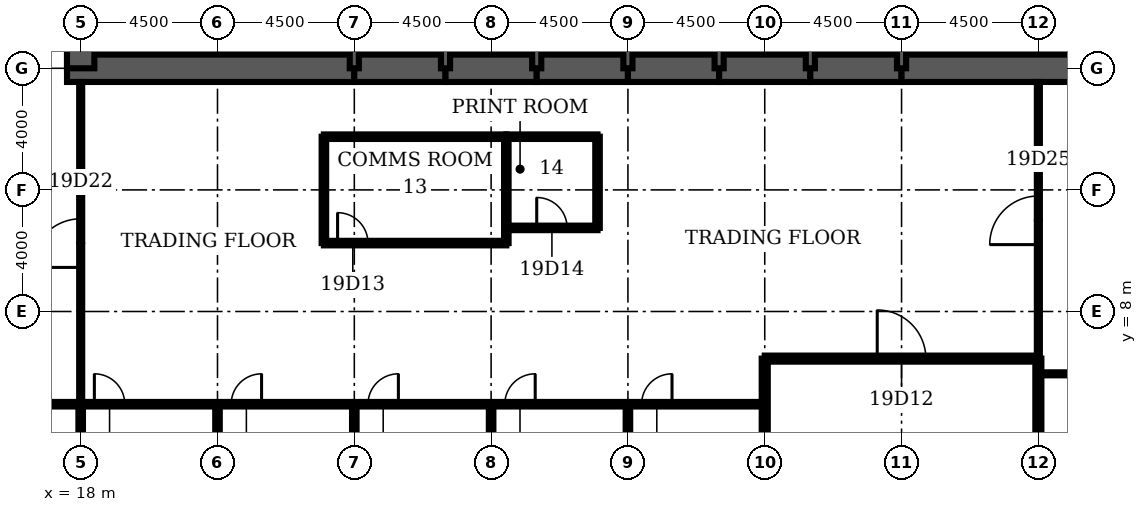
"""IFC4 building model, lengths in metres.
Left out: names, types, materials, properties, quantities, classifications, styles, units other than length and angle.
Written with IfcOpenShell. Run it as: python <this file> out.ifc"""

import sys

from ifc_helpers import new_model, si_unit, direction, frame, frame_2d, origin, place, context, subcontext, project, spatial, rectangle, extrude, element, fill, save


model = new_model("IFC4")
c1 = context("Model", 3, precision=1e-05, world=origin(), true_north=direction((0.0, 1.0)))
c2 = subcontext(c1, "Body", "Model", "MODEL_VIEW")
j1 = project(units=[si_unit("LENGTHUNIT", "METRE"), si_unit("PLANEANGLEUNIT", "RADIAN")], contexts=[c1])
p1 = place(None, origin())
s1 = spatial("IfcSite", under=j1, at=p1, CompositionType="ELEMENT")
p2 = place(p1, origin())
s2 = spatial("IfcBuilding", under=s1, at=p2, CompositionType="ELEMENT")
p3 = place(p2, frame((0.0, 0.0, 90.5)))
s3 = spatial("IfcBuildingStorey", under=s2, at=p3, CompositionType="ELEMENT", Elevation=90.5)
p4 = place(p3, frame((17.55, 16.0, 0.0), z_axis=(0.0, 0.0, 1.0), x_axis=(1.0, 0.0, 0.0)))
e1 = element("IfcWall", 1, at=p4, inside=s3, PredefinedType="SHEAR", context=c2, shape_type="SweptSolid", body=[
    extrude(rectangle(XDim=9.45, YDim=0.9, at=frame_2d((4.725, 0.0))), origin(), (0.0, 0.0, 1.0), 4.5),
])
for number, where, z_axis, x_axis in (
    (2, (27.0, 16.0, 0.0), (0.0, 0.0, 1.0), (1.0, 0.0, 0.0)),
    (3, (30.0, 16.0, 0.0), (0.0, 0.0, 1.0), (1.0, 0.0, 0.0)),
    (4, (33.0, 16.0, 0.0), (0.0, 0.0, 1.0), (1.0, 0.0, 0.0)),
    (5, (36.0, 16.0, 0.0), (0.0, 0.0, 1.0), (1.0, 0.0, 0.0)),
    (6, (39.0, 16.0, 0.0), (0.0, 0.0, 1.0), (1.0, 0.0, 0.0)),
    (7, (42.0, 16.0, 0.0), (0.0, 0.0, 1.0), (1.0, 0.0, 0.0)),
):
    element("IfcWall", number, at=place(p3, frame(where, z_axis=z_axis, x_axis=x_axis)), inside=s3, PredefinedType="SHEAR", context=c2, shape_type="SweptSolid", body=[
        extrude(rectangle(XDim=3.0, YDim=0.9, at=frame_2d((1.5, 0.0))), origin(), (0.0, 0.0, 1.0), 4.5),
    ])
p5 = place(p3, frame((45.0, 16.0, 0.0), z_axis=(0.0, 0.0, 1.0), x_axis=(1.0, 0.0, 0.0)))
e8 = element("IfcWall", 8, at=p5, inside=s3, PredefinedType="SHEAR", context=c2, shape_type="SweptSolid", body=[
    extrude(rectangle(XDim=9.45, YDim=0.9, at=frame_2d((4.725, 0.0))), origin(), (0.0, 0.0, 1.0), 4.5),
])
p6 = place(p3, frame((18.0, 19.2, 0.0), z_axis=(0.0, 0.0, 1.0), x_axis=(0.0, -1.0, 0.0)))
e9 = element("IfcWall", 9, at=p6, inside=s3, PredefinedType="SHEAR", context=c2, shape_type="SweptSolid", body=[
    extrude(rectangle(XDim=3.2, YDim=0.9, at=frame_2d((1.6, 0.0))), origin(), (0.0, 0.0, 1.0), 4.5),
])
for number, where, z_axis, x_axis in (
    (10, (27.0, 16.0, 0.0), (0.0, 0.0, 1.0), (0.0, 1.0, 0.0)),
    (11, (30.0, 16.0, 0.0), (0.0, 0.0, 1.0), (0.0, 1.0, 0.0)),
    (12, (33.0, 16.0, 0.0), (0.0, 0.0, 1.0), (0.0, 1.0, 0.0)),
    (13, (36.0, 16.0, 0.0), (0.0, 0.0, 1.0), (0.0, 1.0, 0.0)),
    (14, (39.0, 16.0, 0.0), (0.0, 0.0, 1.0), (0.0, 1.0, 0.0)),
    (15, (42.0, 16.0, 0.0), (0.0, 0.0, 1.0), (0.0, 1.0, 0.0)),
    (16, (45.0, 16.0, 0.0), (0.0, 0.0, 1.0), (0.0, 1.0, 0.0)),
):
    element("IfcWall", number, at=place(p3, frame(where, z_axis=z_axis, x_axis=x_axis)), inside=s3, PredefinedType="SOLIDWALL", context=c2, shape_type="SweptSolid", body=[
        extrude(rectangle(XDim=3.2, YDim=0.3, at=frame_2d((1.6, 0.0))), origin(), (0.0, 0.0, 1.0), 4.5),
    ])
p7 = place(p3, frame((4.5, 4.95, 0.0), z_axis=(0.0, 0.0, 1.0), x_axis=(1.0, 0.0, 0.0)))
e17 = element("IfcWall", 17, at=p7, inside=s3, PredefinedType="PARTITIONING", context=c2, shape_type="SweptSolid", body=[
    extrude(rectangle(XDim=36.0, YDim=0.15, at=frame_2d((18.0, 0.0))), origin(), (0.0, 0.0, 1.0), 3.0),
])
p8 = place(p7, frame((0.45, 0.0, 0.0)))
e18 = element("IfcOpeningElement", 18, at=p8, cuts=e17, PredefinedType="OPENING", context=c2, shape_type="SweptSolid", body=[
    extrude(rectangle(XDim=1.0, YDim=2.1, at=frame_2d((0.5, 1.05))), frame((0.0, 0.085, 0.0), z_axis=(0.0, -1.0, 0.0), x_axis=(1.0, 0.0, 0.0)), (0.0, 0.0, 1.0), 0.17),
])
p9 = place(p7, frame((4.95, 0.0, 0.0)))
e19 = element("IfcOpeningElement", 19, at=p9, cuts=e17, PredefinedType="OPENING", context=c2, shape_type="SweptSolid", body=[
    extrude(rectangle(XDim=1.0, YDim=2.1, at=frame_2d((0.5, 1.05))), frame((0.0, 0.085, 0.0), z_axis=(0.0, -1.0, 0.0), x_axis=(1.0, 0.0, 0.0)), (0.0, 0.0, 1.0), 0.17),
])
p10 = place(p7, frame((9.45, 0.0, 0.0)))
e20 = element("IfcOpeningElement", 20, at=p10, cuts=e17, PredefinedType="OPENING", context=c2, shape_type="SweptSolid", body=[
    extrude(rectangle(XDim=1.0, YDim=2.1, at=frame_2d((0.5, 1.05))), frame((0.0, 0.085, 0.0), z_axis=(0.0, -1.0, 0.0), x_axis=(1.0, 0.0, 0.0)), (0.0, 0.0, 1.0), 0.17),
])
p11 = place(p7, frame((13.95, 0.0, 0.0)))
e21 = element("IfcOpeningElement", 21, at=p11, cuts=e17, PredefinedType="OPENING", context=c2, shape_type="SweptSolid", body=[
    extrude(rectangle(XDim=1.0, YDim=2.1, at=frame_2d((0.5, 1.05))), frame((0.0, 0.085, 0.0), z_axis=(0.0, -1.0, 0.0), x_axis=(1.0, 0.0, 0.0)), (0.0, 0.0, 1.0), 0.17),
])
p12 = place(p7, frame((18.45, 0.0, 0.0)))
e22 = element("IfcOpeningElement", 22, at=p12, cuts=e17, PredefinedType="OPENING", context=c2, shape_type="SweptSolid", body=[
    extrude(rectangle(XDim=1.0, YDim=2.1, at=frame_2d((0.5, 1.05))), frame((0.0, 0.085, 0.0), z_axis=(0.0, -1.0, 0.0), x_axis=(1.0, 0.0, 0.0)), (0.0, 0.0, 1.0), 0.17),
])
p13 = place(p7, frame((22.95, 0.0, 0.0)))
e23 = element("IfcOpeningElement", 23, at=p13, cuts=e17, PredefinedType="OPENING", context=c2, shape_type="SweptSolid", body=[
    extrude(rectangle(XDim=1.0, YDim=2.1, at=frame_2d((0.5, 1.05))), frame((0.0, 0.085, 0.0), z_axis=(0.0, -1.0, 0.0), x_axis=(1.0, 0.0, 0.0)), (0.0, 0.0, 1.0), 0.17),
])
p14 = place(p7, frame((27.45, 0.0, 0.0)))
e24 = element("IfcOpeningElement", 24, at=p14, cuts=e17, PredefinedType="OPENING", context=c2, shape_type="SweptSolid", body=[
    extrude(rectangle(XDim=1.0, YDim=2.1, at=frame_2d((0.5, 1.05))), frame((0.0, 0.085, 0.0), z_axis=(0.0, -1.0, 0.0), x_axis=(1.0, 0.0, 0.0)), (0.0, 0.0, 1.0), 0.17),
])
p15 = place(p7, frame((31.95, 0.0, 0.0)))
e25 = element("IfcOpeningElement", 25, at=p15, cuts=e17, PredefinedType="OPENING", context=c2, shape_type="SweptSolid", body=[
    extrude(rectangle(XDim=1.0, YDim=2.1, at=frame_2d((0.5, 1.05))), frame((0.0, 0.085, 0.0), z_axis=(0.0, -1.0, 0.0), x_axis=(1.0, 0.0, 0.0)), (0.0, 0.0, 1.0), 0.17),
])
p16 = place(p3, frame((49.5, 5.95, 0.0), z_axis=(0.0, 0.0, 1.0), x_axis=(1.0, 0.0, 0.0)))
e26 = element("IfcWall", 26, at=p16, inside=s3, PredefinedType="PARTITIONING", context=c2, shape_type="SweptSolid", body=[
    extrude(rectangle(XDim=9.0, YDim=0.1, at=frame_2d((4.5, 0.0))), origin(), (0.0, 0.0, 1.0), 3.0),
])
p17 = place(p16, frame((4.0, 0.0, 0.0)))
e27 = element("IfcOpeningElement", 27, at=p17, cuts=e26, PredefinedType="OPENING", context=c2, shape_type="SweptSolid", body=[
    extrude(rectangle(XDim=1.0, YDim=2.1, at=frame_2d((0.5, 1.05))), frame((0.0, 0.06, 0.0), z_axis=(0.0, -1.0, 0.0), x_axis=(1.0, 0.0, 0.0)), (0.0, 0.0, 1.0), 0.12),
])
p18 = place(p3, frame((40.5, 6.45, 0.0), z_axis=(0.0, 0.0, 1.0), x_axis=(1.0, 0.0, 0.0)))
e28 = element("IfcWall", 28, at=p18, inside=s3, PredefinedType="PARTITIONING", context=c2, shape_type="SweptSolid", body=[
    extrude(rectangle(XDim=9.0, YDim=0.2, at=frame_2d((4.5, 0.0))), origin(), (0.0, 0.0, 1.0), 3.0),
])
p19 = place(p18, frame((3.7, 0.0, 0.0)))
e29 = element("IfcOpeningElement", 29, at=p19, cuts=e28, PredefinedType="OPENING", context=c2, shape_type="SweptSolid", body=[
    extrude(rectangle(XDim=1.6, YDim=2.1, at=frame_2d((0.8, 1.05))), frame((0.0, 0.11, 0.0), z_axis=(0.0, -1.0, 0.0), x_axis=(1.0, 0.0, 0.0)), (0.0, 0.0, 1.0), 0.22),
])
p20 = place(p3, frame((26.0, 10.25, 0.0), z_axis=(0.0, 0.0, 1.0), x_axis=(1.0, 0.0, 0.0)))
e30 = element("IfcWall", 30, at=p20, inside=s3, PredefinedType="PARTITIONING", context=c2, shape_type="SweptSolid", body=[
    extrude(rectangle(XDim=6.0, YDim=0.15, at=frame_2d((3.0, 0.0))), origin(), (0.0, 0.0, 1.0), 3.0),
])
p21 = place(p20, frame((0.45, 0.0, 0.0)))
e31 = element("IfcOpeningElement", 31, at=p21, cuts=e30, PredefinedType="OPENING", context=c2, shape_type="SweptSolid", body=[
    extrude(rectangle(XDim=1.0, YDim=2.1, at=frame_2d((0.5, 1.05))), frame((0.0, 0.085, 0.0), z_axis=(0.0, -1.0, 0.0), x_axis=(1.0, 0.0, 0.0)), (0.0, 0.0, 1.0), 0.17),
])
p22 = place(p3, frame((32.0, 10.75, 0.0), z_axis=(0.0, 0.0, 1.0), x_axis=(1.0, 0.0, 0.0)))
e32 = element("IfcWall", 32, at=p22, inside=s3, PredefinedType="PARTITIONING", context=c2, shape_type="SweptSolid", body=[
    extrude(rectangle(XDim=3.0, YDim=0.15, at=frame_2d((1.5, 0.0))), origin(), (0.0, 0.0, 1.0), 3.0),
])
p23 = place(p22, frame((1.0, 0.0, 0.0)))
e33 = element("IfcOpeningElement", 33, at=p23, cuts=e32, PredefinedType="OPENING", context=c2, shape_type="SweptSolid", body=[
    extrude(rectangle(XDim=1.0, YDim=2.1, at=frame_2d((0.5, 1.05))), frame((0.0, 0.085, 0.0), z_axis=(0.0, -1.0, 0.0), x_axis=(1.0, 0.0, 0.0)), (0.0, 0.0, 1.0), 0.17),
])
p24 = place(p3, frame((26.0, 13.75, 0.0), z_axis=(0.0, 0.0, 1.0), x_axis=(1.0, 0.0, 0.0)))
e34 = element("IfcWall", 34, at=p24, inside=s3, PredefinedType="PARTITIONING", context=c2, shape_type="SweptSolid", body=[
    extrude(rectangle(XDim=6.0, YDim=0.15, at=frame_2d((3.0, 0.0))), origin(), (0.0, 0.0, 1.0), 3.0),
])
p25 = place(p3, frame((32.0, 13.75, 0.0), z_axis=(0.0, 0.0, 1.0), x_axis=(1.0, 0.0, 0.0)))
e35 = element("IfcWall", 35, at=p25, inside=s3, PredefinedType="PARTITIONING", context=c2, shape_type="SweptSolid", body=[
    extrude(rectangle(XDim=3.0, YDim=0.15, at=frame_2d((1.5, 0.0))), origin(), (0.0, 0.0, 1.0), 3.0),
])
p26 = place(p3, frame((18.0, 0.45, 0.0), z_axis=(0.0, 0.0, 1.0), x_axis=(0.0, 1.0, 0.0)))
e36 = element("IfcWall", 36, at=p26, inside=s3, PredefinedType="PARTITIONING", context=c2, shape_type="SweptSolid", body=[
    extrude(rectangle(XDim=4.5, YDim=0.15, at=frame_2d((2.25, 0.0))), origin(), (0.0, 0.0, 1.0), 3.0),
])
p27 = place(p3, frame((18.0, 4.95, 0.0), z_axis=(0.0, 0.0, 1.0), x_axis=(0.0, 1.0, 0.0)))
e37 = element("IfcWall", 37, at=p27, inside=s3, PredefinedType="PARTITIONING", context=c2, shape_type="SweptSolid", body=[
    extrude(rectangle(XDim=10.6, YDim=0.1, at=frame_2d((5.3, 0.0))), origin(), (0.0, 0.0, 1.0), 3.0),
])
p28 = place(p27, frame((4.5, 0.0, 0.0)))
e38 = element("IfcOpeningElement", 38, at=p28, cuts=e37, PredefinedType="OPENING", context=c2, shape_type="SweptSolid", body=[
    extrude(rectangle(XDim=1.6, YDim=2.1, at=frame_2d((0.8, 1.05))), frame((0.0, 0.06, 0.0), z_axis=(0.0, -1.0, 0.0), x_axis=(1.0, 0.0, 0.0)), (0.0, 0.0, 1.0), 0.12),
])
p29 = place(p3, frame((22.5, 0.45, 0.0), z_axis=(0.0, 0.0, 1.0), x_axis=(0.0, 1.0, 0.0)))
e39 = element("IfcWall", 39, at=p29, inside=s3, PredefinedType="PARTITIONING", context=c2, shape_type="SweptSolid", body=[
    extrude(rectangle(XDim=4.5, YDim=0.15, at=frame_2d((2.25, 0.0))), origin(), (0.0, 0.0, 1.0), 3.0),
])
p30 = place(p3, frame((26.0, 10.25, 0.0), z_axis=(0.0, 0.0, 1.0), x_axis=(0.0, 1.0, 0.0)))
e40 = element("IfcWall", 40, at=p30, inside=s3, PredefinedType="PARTITIONING", context=c2, shape_type="SweptSolid", body=[
    extrude(rectangle(XDim=3.5, YDim=0.15, at=frame_2d((1.75, 0.0))), origin(), (0.0, 0.0, 1.0), 3.0),
])
for number, where, z_axis, x_axis in (
    (41, (27.0, 0.45, 0.0), (0.0, 0.0, 1.0), (0.0, 1.0, 0.0)),
    (42, (31.5, 0.45, 0.0), (0.0, 0.0, 1.0), (0.0, 1.0, 0.0)),
):
    element("IfcWall", number, at=place(p3, frame(where, z_axis=z_axis, x_axis=x_axis)), inside=s3, PredefinedType="PARTITIONING", context=c2, shape_type="SweptSolid", body=[
        extrude(rectangle(XDim=4.5, YDim=0.15, at=frame_2d((2.25, 0.0))), origin(), (0.0, 0.0, 1.0), 3.0),
    ])
p31 = place(p3, frame((32.0, 10.25, 0.0), z_axis=(0.0, 0.0, 1.0), x_axis=(0.0, 1.0, 0.0)))
e43 = element("IfcWall", 43, at=p31, inside=s3, PredefinedType="PARTITIONING", context=c2, shape_type="SweptSolid", body=[
    extrude(rectangle(XDim=3.5, YDim=0.15, at=frame_2d((1.75, 0.0))), origin(), (0.0, 0.0, 1.0), 3.0),
])
p32 = place(p3, frame((35.0, 10.75, 0.0), z_axis=(0.0, 0.0, 1.0), x_axis=(0.0, 1.0, 0.0)))
e44 = element("IfcWall", 44, at=p32, inside=s3, PredefinedType="PARTITIONING", context=c2, shape_type="SweptSolid", body=[
    extrude(rectangle(XDim=3.0, YDim=0.15, at=frame_2d((1.5, 0.0))), origin(), (0.0, 0.0, 1.0), 3.0),
])
p33 = place(p3, frame((36.0, 0.45, 0.0), z_axis=(0.0, 0.0, 1.0), x_axis=(0.0, 1.0, 0.0)))
e45 = element("IfcWall", 45, at=p33, inside=s3, PredefinedType="PARTITIONING", context=c2, shape_type="SweptSolid", body=[
    extrude(rectangle(XDim=4.5, YDim=0.15, at=frame_2d((2.25, 0.0))), origin(), (0.0, 0.0, 1.0), 3.0),
])
for number, where, z_axis, x_axis in (
    (46, (40.5, 0.45, 0.0), (0.0, 0.0, 1.0), (0.0, 1.0, 0.0)),
    (47, (49.5, 0.45, 0.0), (0.0, 0.0, 1.0), (0.0, 1.0, 0.0)),
):
    element("IfcWall", number, at=place(p3, frame(where, z_axis=z_axis, x_axis=x_axis)), inside=s3, PredefinedType="PARTITIONING", context=c2, shape_type="SweptSolid", body=[
        extrude(rectangle(XDim=6.0, YDim=0.2, at=frame_2d((3.0, 0.0))), origin(), (0.0, 0.0, 1.0), 3.0),
    ])
p34 = place(p3, frame((49.5, 6.45, 0.0), z_axis=(0.0, 0.0, 1.0), x_axis=(0.0, 1.0, 0.0)))
e48 = element("IfcWall", 48, at=p34, inside=s3, PredefinedType="PARTITIONING", context=c2, shape_type="SweptSolid", body=[
    extrude(rectangle(XDim=9.1, YDim=0.1, at=frame_2d((4.55, 0.0))), origin(), (0.0, 0.0, 1.0), 3.0),
])
p35 = place(p34, frame((3.75, 0.0, 0.0)))
e49 = element("IfcOpeningElement", 49, at=p35, cuts=e48, PredefinedType="OPENING", context=c2, shape_type="SweptSolid", body=[
    extrude(rectangle(XDim=1.6, YDim=2.1, at=frame_2d((0.8, 1.05))), frame((0.0, 0.06, 0.0), z_axis=(0.0, -1.0, 0.0), x_axis=(1.0, 0.0, 0.0)), (0.0, 0.0, 1.0), 0.12),
])
p36 = place(p11, origin())
e50 = element("IfcDoor", 50, at=p36, inside=s3, OperationType="SINGLE_SWING_LEFT", PredefinedType="DOOR", context=c2, shape_type="SweptSolid", body=[
    extrude(rectangle(XDim=1.0, YDim=2.1, at=frame_2d((0.5, 1.05))), frame((0.0, 0.025, 0.0), z_axis=(0.0, -1.0, 0.0), x_axis=(1.0, 0.0, 0.0)), (0.0, 0.0, 1.0), 0.05),
])
fill(e21, e50)
p37 = place(p12, origin())
e51 = element("IfcDoor", 51, at=p37, inside=s3, OperationType="SINGLE_SWING_RIGHT", PredefinedType="DOOR", context=c2, shape_type="SweptSolid", body=[
    extrude(rectangle(XDim=1.0, YDim=2.1, at=frame_2d((0.5, 1.05))), frame((0.0, 0.025, 0.0), z_axis=(0.0, -1.0, 0.0), x_axis=(1.0, 0.0, 0.0)), (0.0, 0.0, 1.0), 0.05),
])
fill(e22, e51)
p38 = place(p13, origin())
e52 = element("IfcDoor", 52, at=p38, inside=s3, OperationType="SINGLE_SWING_RIGHT", PredefinedType="DOOR", context=c2, shape_type="SweptSolid", body=[
    extrude(rectangle(XDim=1.0, YDim=2.1, at=frame_2d((0.5, 1.05))), frame((0.0, 0.025, 0.0), z_axis=(0.0, -1.0, 0.0), x_axis=(1.0, 0.0, 0.0)), (0.0, 0.0, 1.0), 0.05),
])
fill(e23, e52)
p39 = place(p14, origin())
e53 = element("IfcDoor", 53, at=p39, inside=s3, OperationType="SINGLE_SWING_RIGHT", PredefinedType="DOOR", context=c2, shape_type="SweptSolid", body=[
    extrude(rectangle(XDim=1.0, YDim=2.1, at=frame_2d((0.5, 1.05))), frame((0.0, 0.025, 0.0), z_axis=(0.0, -1.0, 0.0), x_axis=(1.0, 0.0, 0.0)), (0.0, 0.0, 1.0), 0.05),
])
fill(e24, e53)
p40 = place(p15, origin())
e54 = element("IfcDoor", 54, at=p40, inside=s3, OperationType="SINGLE_SWING_RIGHT", PredefinedType="DOOR", context=c2, shape_type="SweptSolid", body=[
    extrude(rectangle(XDim=1.0, YDim=2.1, at=frame_2d((0.5, 1.05))), frame((0.0, 0.025, 0.0), z_axis=(0.0, -1.0, 0.0), x_axis=(1.0, 0.0, 0.0)), (0.0, 0.0, 1.0), 0.05),
])
fill(e25, e54)
p41 = place(p19, origin())
e55 = element("IfcDoor", 55, at=p41, inside=s3, OperationType="SINGLE_SWING_LEFT", PredefinedType="DOOR", context=c2, shape_type="SweptSolid", body=[
    extrude(rectangle(XDim=1.6, YDim=2.1, at=frame_2d((0.8, 1.05))), frame((0.0, 0.025, 0.0), z_axis=(0.0, -1.0, 0.0), x_axis=(1.0, 0.0, 0.0)), (0.0, 0.0, 1.0), 0.05),
])
fill(e29, e55)
p42 = place(p21, origin())
e56 = element("IfcDoor", 56, at=p42, inside=s3, OperationType="SINGLE_SWING_LEFT", PredefinedType="DOOR", context=c2, shape_type="SweptSolid", body=[
    extrude(rectangle(XDim=1.0, YDim=2.1, at=frame_2d((0.5, 1.05))), frame((0.0, 0.025, 0.0), z_axis=(0.0, -1.0, 0.0), x_axis=(1.0, 0.0, 0.0)), (0.0, 0.0, 1.0), 0.05),
])
fill(e31, e56)
p43 = place(p23, origin())
e57 = element("IfcDoor", 57, at=p43, inside=s3, OperationType="SINGLE_SWING_LEFT", PredefinedType="DOOR", context=c2, shape_type="SweptSolid", body=[
    extrude(rectangle(XDim=1.0, YDim=2.1, at=frame_2d((0.5, 1.05))), frame((0.0, 0.025, 0.0), z_axis=(0.0, -1.0, 0.0), x_axis=(1.0, 0.0, 0.0)), (0.0, 0.0, 1.0), 0.05),
])
fill(e33, e57)
p44 = place(p28, origin())
e58 = element("IfcDoor", 58, at=p44, inside=s3, OperationType="SINGLE_SWING_LEFT", PredefinedType="DOOR", context=c2, shape_type="SweptSolid", body=[
    extrude(rectangle(XDim=1.6, YDim=2.1, at=frame_2d((0.8, 1.05))), frame((0.0, 0.025, 0.0), z_axis=(0.0, -1.0, 0.0), x_axis=(1.0, 0.0, 0.0)), (0.0, 0.0, 1.0), 0.05),
])
fill(e38, e58)
p45 = place(p35, origin())
e59 = element("IfcDoor", 59, at=p45, inside=s3, OperationType="SINGLE_SWING_LEFT", PredefinedType="DOOR", context=c2, shape_type="SweptSolid", body=[
    extrude(rectangle(XDim=1.6, YDim=2.1, at=frame_2d((0.8, 1.05))), frame((0.0, 0.025, 0.0), z_axis=(0.0, -1.0, 0.0), x_axis=(1.0, 0.0, 0.0)), (0.0, 0.0, 1.0), 0.05),
])
fill(e49, e59)
save(model, sys.argv[1])
